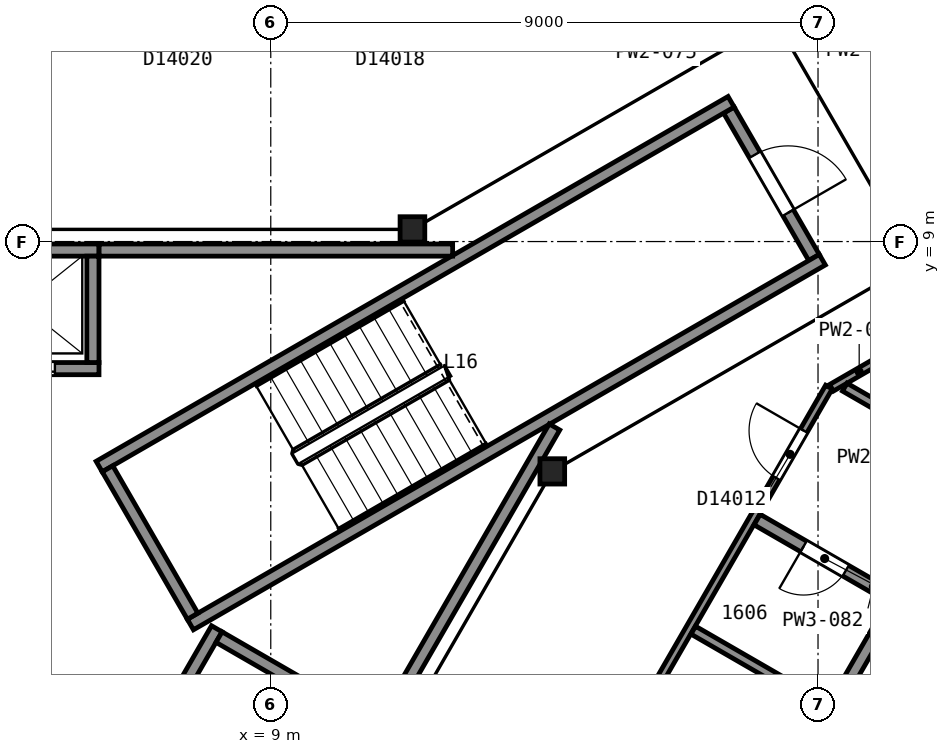
"""IFC4 building model, lengths in metres.
Left out: names, types, materials, properties, quantities, classifications, styles, units other than length and angle.
Written with IfcOpenShell. Run it as: python <this file> out.ifc"""

import sys

from ifc_helpers import new_model, si_unit, direction, frame, frame_2d, origin, origin_2d, place, context, subcontext, project, spatial, rectangle, i_section, extrude, element, fill, save


model = new_model("IFC4")
c1 = context("Model", 3, precision=1e-05, world=origin(), true_north=direction((0.0, 1.0)))
c2 = subcontext(c1, "Body", "Model", "MODEL_VIEW")
j1 = project(units=[si_unit("LENGTHUNIT", "METRE"), si_unit("PLANEANGLEUNIT", "RADIAN")], contexts=[c1])
p1 = place(None, origin())
s1 = spatial("IfcSite", under=j1, at=p1, CompositionType="ELEMENT")
p2 = place(p1, origin())
s2 = spatial("IfcBuilding", under=s1, at=p2, CompositionType="ELEMENT")
p3 = place(p2, frame((0.0, 0.0, 72.8)))
s3 = spatial("IfcBuildingStorey", under=s2, at=p3, CompositionType="ELEMENT", Elevation=72.8)
for number, where, z_axis, x_axis in (
    (1, (13.63, 5.22, 0.0), (0.0, 0.0, 1.0), (1.0, 0.0, 0.0)),
    (2, (11.33, 9.2, 0.0), (0.0, 0.0, 1.0), (1.0, 0.0, 0.0)),
):
    element("IfcColumn", number, at=place(p3, frame(where, z_axis=z_axis, x_axis=x_axis)), inside=s3, PredefinedType="COLUMN", context=c2, shape_type="SweptSolid", body=[
        extrude(i_section(OverallWidth=0.406, OverallDepth=0.417, WebThickness=0.03, FlangeThickness=0.048, FilletRadius=0.015, at=origin_2d()), origin(), (0.0, 0.0, 1.0), 3.6),
    ])
p4 = place(p3, frame((17.934, 8.738, 0.0), z_axis=(0.0, 0.0, 1.0), x_axis=(-0.49998411664, 0.866034573852, 0.0)))
e3 = element("IfcWall", 3, at=p4, inside=s3, PredefinedType="PARTITIONING", context=c2, shape_type="SweptSolid", body=[
    extrude(rectangle(XDim=2.8, YDim=0.2, at=frame_2d((1.4, 0.0))), origin(), (0.0, 0.0, 1.0), 3.35),
])
p5 = place(p4, frame((0.85, 0.0, 0.0)))
e4 = element("IfcOpeningElement", 4, at=p5, cuts=e3, PredefinedType="OPENING", context=c2, shape_type="SweptSolid", body=[
    extrude(rectangle(XDim=1.1, YDim=2.1, at=frame_2d((0.55, 1.05))), frame((0.0, 0.11, 0.0), z_axis=(0.0, -1.0, 0.0), x_axis=(1.0, 0.0, 0.0)), (0.0, 0.0, 1.0), 0.22),
])
for number, where, z_axis, x_axis in (
    (5, (6.178, 5.299, 0.0), (0.0, 0.0, 1.0), (0.866, 0.5, 0.0)),
    (6, (7.678, 2.701, 0.0), (0.0, 0.0, 1.0), (0.866, 0.5, 0.0)),
):
    element("IfcWall", number, at=place(p3, frame(where, z_axis=z_axis, x_axis=x_axis)), inside=s3, PredefinedType="PARTITIONING", context=c2, shape_type="SweptSolid", body=[
        extrude(rectangle(XDim=12.0, YDim=0.2, at=frame_2d((6.0, 0.0))), origin(), (0.0, 0.0, 1.0), 3.35),
    ])
p6 = place(p3, frame((7.715, 2.838, 0.0), z_axis=(0.0, 0.0, 1.0), x_axis=(-0.500049511043, 0.865996816683, 0.0)))
e7 = element("IfcWall", 7, at=p6, inside=s3, PredefinedType="PARTITIONING", context=c2, shape_type="SweptSolid", body=[
    extrude(rectangle(XDim=2.8, YDim=0.2, at=frame_2d((1.4, 0.0))), origin(), (0.0, 0.0, 1.0), 3.35),
])
p7 = place(p3, frame((3.625, 6.91, 0.0), z_axis=(0.0, 0.0, 1.0), x_axis=(1.0, 0.0, 0.0)))
e8 = element("IfcWall", 8, at=p7, inside=s3, PredefinedType="PARTITIONING", context=c2, shape_type="SweptSolid", body=[
    extrude(rectangle(XDim=2.55, YDim=0.2, at=frame_2d((1.275, 0.0))), origin(), (0.0, 0.0, 1.0), 3.6),
])
p8 = place(p7, frame((0.725, 0.0, 0.0)))
e9 = element("IfcOpeningElement", 9, at=p8, cuts=e8, PredefinedType="OPENING", context=c2, shape_type="SweptSolid", body=[
    extrude(rectangle(XDim=1.1, YDim=2.1, at=frame_2d((0.55, 1.05))), frame((0.0, 0.11, 0.0), z_axis=(0.0, -1.0, 0.0), x_axis=(1.0, 0.0, 0.0)), (0.0, 0.0, 1.0), 0.22),
])
p9 = place(p3, frame((3.625, 8.86, 0.0), z_axis=(0.0, 0.0, 1.0), x_axis=(1.0, 0.0, 0.0)))
e10 = element("IfcWall", 10, at=p9, inside=s3, PredefinedType="PARTITIONING", context=c2, shape_type="SweptSolid", body=[
    extrude(rectangle(XDim=2.55, YDim=0.2, at=frame_2d((1.275, 0.0))), origin(), (0.0, 0.0, 1.0), 3.6),
])
p10 = place(p3, frame((5.663, -1.612, 0.0), z_axis=(0.0, 0.0, 1.0), x_axis=(0.49998122708, 0.866036242063, 0.0)))
e11 = element("IfcWall", 11, at=p10, inside=s3, PredefinedType="PARTITIONING", context=c2, shape_type="SweptSolid", body=[
    extrude(rectangle(XDim=4.9, YDim=0.2, at=frame_2d((2.45, 0.0))), origin(), (0.0, 0.0, 1.0), 3.6),
])
p11 = place(p3, frame((6.075, 7.01, 0.0), z_axis=(0.0, 0.0, 1.0), x_axis=(0.0, 1.0, 0.0)))
e12 = element("IfcWall", 12, at=p11, inside=s3, PredefinedType="PARTITIONING", context=c2, shape_type="SweptSolid", body=[
    extrude(rectangle(XDim=1.75, YDim=0.2, at=frame_2d((0.875, 0.0))), origin(), (0.0, 0.0, 1.0), 3.6),
])
p12 = place(p3, frame((9.665, 1.62, 0.0), z_axis=(0.0, 0.0, 1.0), x_axis=(-0.866002029911, 0.500040482552, 0.0)))
e13 = element("IfcWall", 13, at=p12, inside=s3, PredefinedType="PARTITIONING", context=c2, shape_type="SweptSolid", body=[
    extrude(rectangle(XDim=1.75, YDim=0.2, at=frame_2d((0.875, 0.0))), origin(), (0.0, 0.0, 1.0), 3.6),
])
p13 = place(p3, frame((6.177, 8.86, 0.0), z_axis=(0.0, 0.0, 1.0), x_axis=(1.0, 0.0, 0.0)))
e14 = element("IfcWall", 14, at=p13, inside=s3, PredefinedType="PARTITIONING", context=c2, shape_type="SweptSolid", body=[
    extrude(rectangle(XDim=5.814, YDim=0.2, at=frame_2d((2.907, 0.0))), origin(), (0.0, 0.0, 1.0), 3.35),
])
p14 = place(p3, frame((8.492, -3.012, 0.0), z_axis=(0.0, 0.0, 1.0), x_axis=(0.499972957231, 0.866041016371, 0.0)))
e15 = element("IfcWall", 15, at=p14, inside=s3, PredefinedType="PARTITIONING", context=c2, shape_type="SweptSolid", body=[
    extrude(rectangle(XDim=10.349, YDim=0.2, at=frame_2d((5.174, 0.0))), origin(), (0.0, 0.0, 1.0), 3.35),
])
p15 = place(p3, frame((18.179, 6.606, 0.0), z_axis=(0.0, 0.0, 1.0), x_axis=(-0.500003973642, -0.866023109589, 0.0)))
e16 = element("IfcWall", 16, at=p15, inside=s3, PredefinedType="PARTITIONING", context=c2, shape_type="SweptSolid", body=[
    extrude(rectangle(XDim=28.826, YDim=0.125, at=frame_2d((14.413, 0.0))), origin(), (0.0, 0.0, 1.0), 2.613),
])
p16 = place(p15, frame((21.501, 0.0, 0.0)))
e17 = element("IfcOpeningElement", 17, at=p16, cuts=e16, PredefinedType="OPENING", context=c2, shape_type="SweptSolid", body=[
    extrude(rectangle(XDim=0.9, YDim=2.1, at=frame_2d((0.45, 1.05))), frame((0.0, 0.073, 0.0), z_axis=(0.0, -1.0, 0.0), x_axis=(1.0, 0.0, 0.0)), (0.0, 0.0, 1.0), 0.145),
])
p17 = place(p15, frame((18.894, 0.0, 0.0)))
e18 = element("IfcOpeningElement", 18, at=p17, cuts=e16, PredefinedType="OPENING", context=c2, shape_type="SweptSolid", body=[
    extrude(rectangle(XDim=0.9, YDim=2.1, at=frame_2d((0.45, 1.05))), frame((0.0, 0.073, 0.0), z_axis=(0.0, -1.0, 0.0), x_axis=(1.0, 0.0, 0.0)), (0.0, 0.0, 1.0), 0.145),
])
p18 = place(p15, frame((10.937, 0.0, 0.0)))
e19 = element("IfcOpeningElement", 19, at=p18, cuts=e16, PredefinedType="OPENING", context=c2, shape_type="SweptSolid", body=[
    extrude(rectangle(XDim=0.9, YDim=2.1, at=frame_2d((0.45, 1.05))), frame((0.0, 0.073, 0.0), z_axis=(0.0, -1.0, 0.0), x_axis=(1.0, 0.0, 0.0)), (0.0, 0.0, 1.0), 0.145),
])
p19 = place(p15, frame((7.535, 0.0, 0.0)))
e20 = element("IfcOpeningElement", 20, at=p19, cuts=e16, PredefinedType="OPENING", context=c2, shape_type="SweptSolid", body=[
    extrude(rectangle(XDim=0.9, YDim=2.1, at=frame_2d((0.45, 1.05))), frame((0.0, 0.073, 0.0), z_axis=(0.0, -1.0, 0.0), x_axis=(1.0, 0.0, 0.0)), (0.0, 0.0, 1.0), 0.145),
])
p20 = place(p15, frame((0.827, 0.0, 0.0)))
e21 = element("IfcOpeningElement", 21, at=p20, cuts=e16, PredefinedType="OPENING", context=c2, shape_type="SweptSolid", body=[
    extrude(rectangle(XDim=0.9, YDim=2.1, at=frame_2d((0.45, 1.05))), frame((0.0, 0.073, 0.0), z_axis=(0.0, -1.0, 0.0), x_axis=(1.0, 0.0, 0.0)), (0.0, 0.0, 1.0), 0.145),
])
p21 = place(p3, frame((15.948, 2.608, 0.0), z_axis=(0.0, 0.0, 1.0), x_axis=(0.866059124033, -0.499941590267, 0.0)))
e22 = element("IfcWall", 22, at=p21, inside=s3, PredefinedType="PARTITIONING", context=c2, shape_type="SweptSolid", body=[
    extrude(rectangle(XDim=8.487, YDim=0.15, at=frame_2d((4.243, 0.0))), origin(), (0.0, 0.0, 1.0), 2.613),
])
p22 = place(p3, frame((19.366, 3.061, 0.0), z_axis=(0.0, 0.0, 1.0), x_axis=(-0.866102295869, 0.499866795347, 0.0)))
e23 = element("IfcWall", 23, at=p22, inside=s3, PredefinedType="PARTITIONING", context=c2, shape_type="SweptSolid", body=[
    extrude(rectangle(XDim=2.733, YDim=0.2, at=frame_2d((1.367, 0.0))), origin(), (0.0, 0.0, 1.0), 2.613),
])
p23 = place(p22, frame((1.051, 0.0, 0.0)))
e24 = element("IfcOpeningElement", 24, at=p23, cuts=e23, PredefinedType="OPENING", context=c2, shape_type="SweptSolid", body=[
    extrude(rectangle(XDim=0.8, YDim=2.1, at=frame_2d((0.4, 1.05))), frame((0.0, 0.11, 0.0), z_axis=(0.0, -1.0, 0.0), x_axis=(1.0, 0.0, 0.0)), (0.0, 0.0, 1.0), 0.22),
])
p24 = place(p3, frame((18.222, 6.594, 0.0), z_axis=(0.0, 0.0, 1.0), x_axis=(0.865876245925, 0.500258260045, 0.0)))
e25 = element("IfcWall", 25, at=p24, inside=s3, PredefinedType="PARTITIONING", context=c2, shape_type="SweptSolid", body=[
    extrude(rectangle(XDim=1.052, YDim=0.125, at=frame_2d((0.526, 0.0))), origin(), (0.0, 0.0, 1.0), 2.613),
])
p25 = place(p3, frame((18.269, 1.361, 0.0), z_axis=(0.0, 0.0, 1.0), x_axis=(0.499993829411, 0.866028966346, 0.0)))
e26 = element("IfcWall", 26, at=p25, inside=s3, PredefinedType="PARTITIONING", context=c2, shape_type="SweptSolid", body=[
    extrude(rectangle(XDim=1.921, YDim=0.2, at=frame_2d((0.96, 0.0))), origin(), (0.0, 0.0, 1.0), 2.613),
])
p26 = place(p3, frame((18.44, 6.605, 0.0), z_axis=(0.0, 0.0, 1.0), x_axis=(0.866044499518, -0.49996692376, 0.0)))
e27 = element("IfcWall", 27, at=p26, inside=s3, PredefinedType="PARTITIONING", context=c2, shape_type="SweptSolid", body=[
    extrude(rectangle(XDim=8.328, YDim=0.15, at=frame_2d((4.164, 0.0))), origin(), (0.0, 0.0, 1.0), 2.613),
])
p27 = place(p5, origin())
e28 = element("IfcDoor", 28, at=p27, inside=s3, OperationType="SINGLE_SWING_LEFT", PredefinedType="DOOR", context=c2, shape_type="SweptSolid", body=[
    extrude(rectangle(XDim=1.1, YDim=2.1, at=frame_2d((0.55, 1.05))), frame((0.0, 0.025, 0.0), z_axis=(0.0, -1.0, 0.0), x_axis=(1.0, 0.0, 0.0)), (0.0, 0.0, 1.0), 0.05),
])
fill(e4, e28)
p28 = place(p8, origin())
e29 = element("IfcDoor", 29, at=p28, inside=s3, OperationType="SLIDING_TO_LEFT", PredefinedType="DOOR", context=c2, shape_type="SweptSolid", body=[
    extrude(rectangle(XDim=1.1, YDim=2.1, at=frame_2d((0.55, 1.05))), frame((0.0, 0.025, 0.0), z_axis=(0.0, -1.0, 0.0), x_axis=(1.0, 0.0, 0.0)), (0.0, 0.0, 1.0), 0.05),
])
fill(e9, e29)
p29 = place(p20, origin())
e30 = element("IfcDoor", 30, at=p29, inside=s3, OperationType="SINGLE_SWING_LEFT", PredefinedType="DOOR", context=c2, shape_type="SweptSolid", body=[
    extrude(rectangle(XDim=0.9, YDim=2.1, at=frame_2d((0.45, 1.05))), frame((0.0, 0.025, 0.0), z_axis=(0.0, -1.0, 0.0), x_axis=(1.0, 0.0, 0.0)), (0.0, 0.0, 1.0), 0.05),
])
fill(e21, e30)
p30 = place(p23, origin())
e31 = element("IfcDoor", 31, at=p30, inside=s3, OperationType="SINGLE_SWING_RIGHT", PredefinedType="DOOR", context=c2, shape_type="SweptSolid", body=[
    extrude(rectangle(XDim=0.8, YDim=2.1, at=frame_2d((0.4, 1.05))), frame((0.0, 0.025, 0.0), z_axis=(0.0, -1.0, 0.0), x_axis=(1.0, 0.0, 0.0)), (0.0, 0.0, 1.0), 0.05),
])
fill(e24, e31)
save(model, sys.argv[1])
